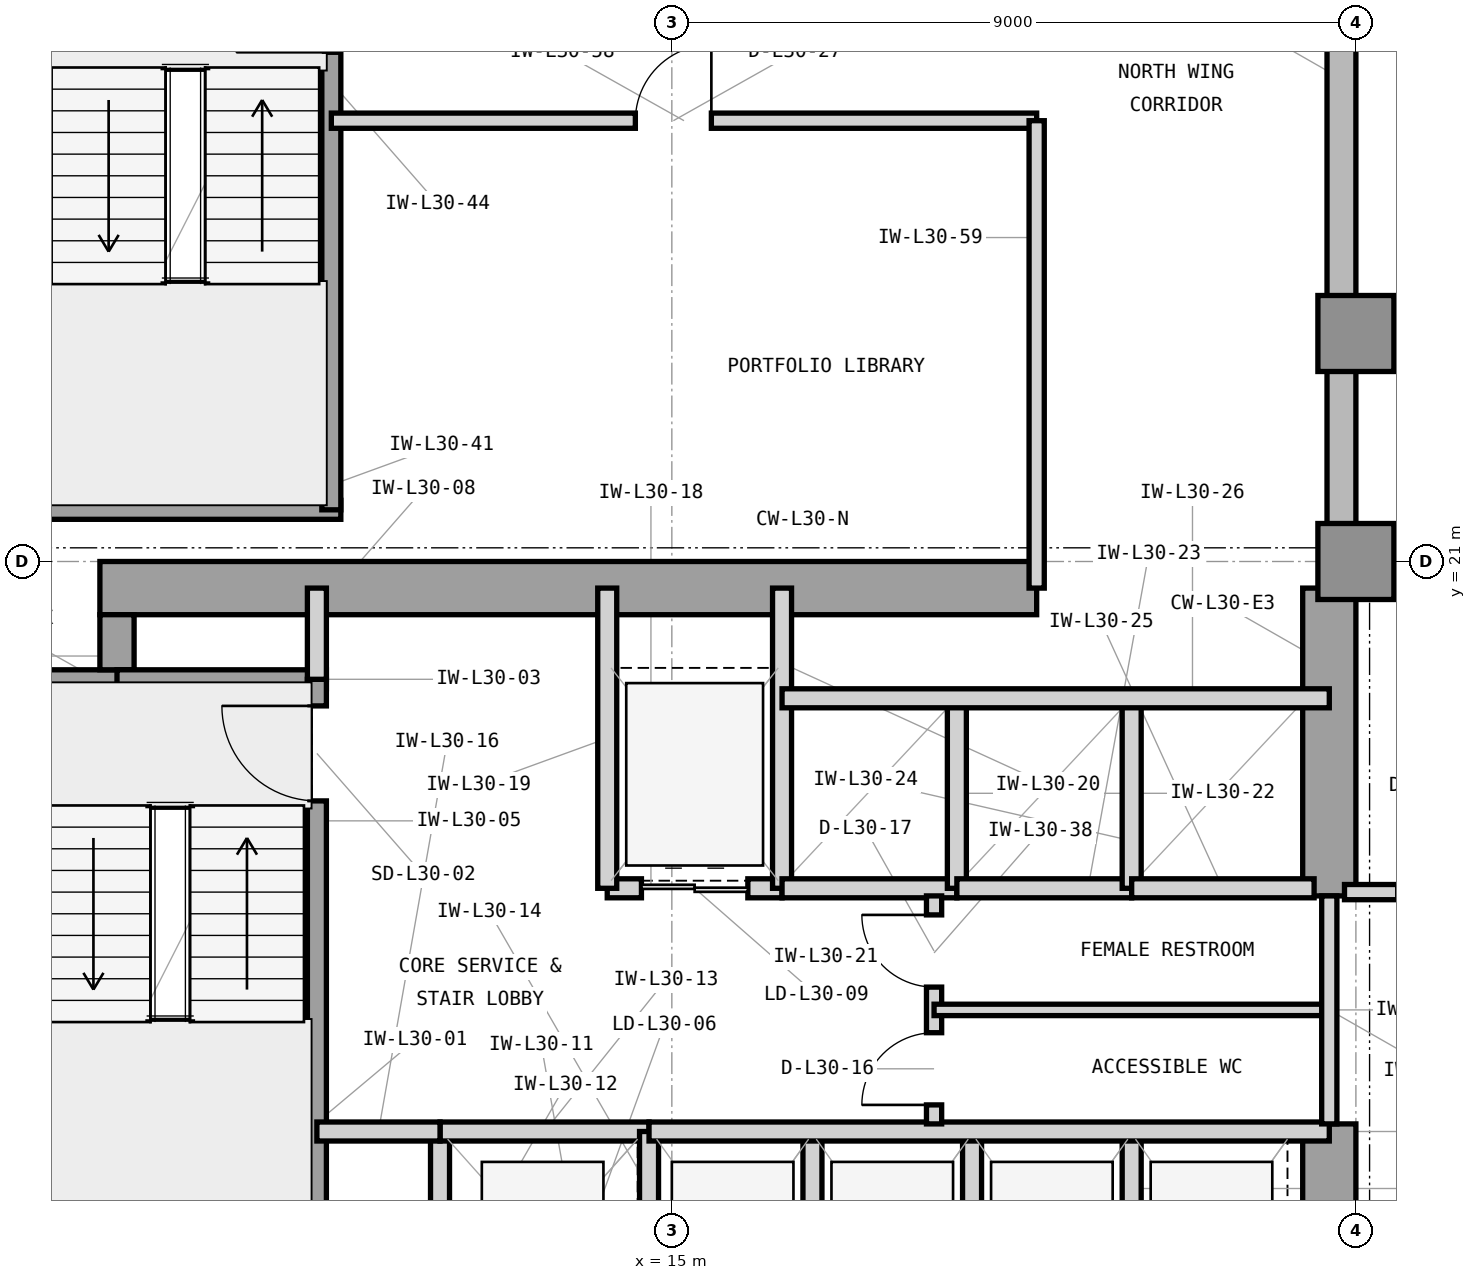
"""IFC4 building model, lengths in metres.
Left out: names, types, materials, properties, quantities, classifications, styles, units other than length and angle.
Written with IfcOpenShell. Run it as: python <this file> out.ifc"""

import sys

from ifc_helpers import new_model, si_unit, direction, frame, frame_2d, origin, origin_2d, place, context, subcontext, project, spatial, rectangle, extrude, element, fill, save


model = new_model("IFC4")
c1 = context("Model", 3, precision=1e-05, world=origin(), true_north=direction((0.0, 1.0)))
c2 = subcontext(c1, "Body", "Model", "MODEL_VIEW")
j1 = project(units=[si_unit("LENGTHUNIT", "METRE"), si_unit("PLANEANGLEUNIT", "RADIAN")], contexts=[c1])
p1 = place(None, origin())
s1 = spatial("IfcSite", under=j1, at=p1, CompositionType="ELEMENT")
p2 = place(p1, origin())
s2 = spatial("IfcBuilding", under=s1, at=p2, CompositionType="ELEMENT")
p3 = place(p2, frame((0.0, 0.0, 128.4)))
s3 = spatial("IfcBuildingStorey", under=s2, at=p3, CompositionType="ELEMENT", Elevation=128.4)
p4 = place(p3, frame((7.475, 20.65, 0.0), z_axis=(0.0, 0.0, 1.0), x_axis=(1.0, 0.0, 0.0)))
e1 = element("IfcWall", 1, at=p4, inside=s3, PredefinedType="SHEAR", context=c2, shape_type="SweptSolid", body=[
    extrude(rectangle(XDim=12.325, YDim=0.7, at=frame_2d((6.163, 0.0))), origin(), (0.0, 0.0, 1.0), 3.9),
])
p5 = place(p3, frame((23.65, 10.4, 0.0), z_axis=(0.0, 0.0, 1.0), x_axis=(0.0, 1.0, 0.0)))
e2 = element("IfcWall", 2, at=p5, inside=s3, PredefinedType="SHEAR", context=c2, shape_type="SweptSolid", body=[
    extrude(rectangle(XDim=3.2, YDim=0.7, at=frame_2d((1.6, 0.0))), origin(), (0.0, 0.0, 1.0), 3.9),
])
p6 = place(p3, frame((23.65, 16.6, 0.0), z_axis=(0.0, 0.0, 1.0), x_axis=(0.0, 1.0, 0.0)))
e3 = element("IfcWall", 3, at=p6, inside=s3, PredefinedType="SHEAR", context=c2, shape_type="SweptSolid", body=[
    extrude(rectangle(XDim=4.05, YDim=0.7, at=frame_2d((2.025, 0.0))), origin(), (0.0, 0.0, 1.0), 3.9),
])
p7 = place(p3, frame((6.7, 19.35, 0.0), z_axis=(0.0, 0.0, 1.0), x_axis=(1.0, 0.0, 0.0)))
e4 = element("IfcWall", 4, at=p7, inside=s3, PredefinedType="SHEAR", context=c2, shape_type="SweptSolid", body=[
    extrude(rectangle(XDim=1.225, YDim=0.45, at=frame_2d((0.613, 0.0))), origin(), (0.0, 0.0, 1.0), 3.9),
])
p8 = place(p3, frame((7.7, 19.575, 0.0), z_axis=(0.0, 0.0, 1.0), x_axis=(0.0, 1.0, 0.0)))
e5 = element("IfcWall", 5, at=p8, inside=s3, PredefinedType="SHEAR", context=c2, shape_type="SweptSolid", body=[
    extrude(rectangle(XDim=0.725, YDim=0.45, at=frame_2d((0.363, 0.0))), origin(), (0.0, 0.0, 1.0), 3.9),
])
for number, where, z_axis, x_axis in (
    (6, (24.0, 21.0, 0.0), (0.0, 0.0, 1.0), (1.0, 0.0, 0.0)),
    (7, (24.0, 24.0, 0.0), (0.0, 0.0, 1.0), (1.0, 0.0, 0.0)),
):
    element("IfcColumn", number, at=place(p3, frame(where, z_axis=z_axis, x_axis=x_axis)), inside=s3, PredefinedType="COLUMN", context=c2, shape_type="SweptSolid", body=[
        extrude(rectangle(XDim=1.0, YDim=1.0, at=origin_2d()), origin(), (0.0, 0.0, 1.0), 3.9),
    ])
p9 = place(p3, frame((41.55, 20.81, 0.0), z_axis=(0.0, 0.0, 1.0), x_axis=(-1.0, 0.0, 0.0)))
e8 = element("IfcWall", 8, at=p9, inside=s3, PredefinedType="STANDARD", context=c2, shape_type="SweptSolid", body=[
    extrude(rectangle(XDim=17.55, YDim=0.38, at=frame_2d((8.775, 0.0))), origin(), (0.0, 0.0, 1.0), 3.7),
])
p10 = place(p9, frame((2.025, 0.0, 0.85)))
e9 = element("IfcOpeningElement", 9, at=p10, cuts=e8, PredefinedType="OPENING", context=c2, shape_type="SweptSolid", body=[
    extrude(rectangle(XDim=1.8, YDim=2.25, at=frame_2d((0.9, 1.125))), frame((0.0, 0.2, 0.0), z_axis=(0.0, -1.0, 0.0), x_axis=(1.0, 0.0, 0.0)), (0.0, 0.0, 1.0), 0.4),
])
p11 = place(p9, frame((15.384, 0.0, 0.85)))
e10 = element("IfcOpeningElement", 10, at=p11, cuts=e8, PredefinedType="OPENING", context=c2, shape_type="SweptSolid", body=[
    extrude(rectangle(XDim=1.2, YDim=2.25, at=frame_2d((0.6, 1.125))), frame((0.0, 0.2, 0.0), z_axis=(0.0, -1.0, 0.0), x_axis=(1.0, 0.0, 0.0)), (0.0, 0.0, 1.0), 0.4),
])
p12 = place(p9, frame((9.854, 0.0, 0.85)))
e11 = element("IfcOpeningElement", 11, at=p12, cuts=e8, PredefinedType="OPENING", context=c2, shape_type="SweptSolid", body=[
    extrude(rectangle(XDim=2.5, YDim=2.25, at=frame_2d((1.25, 1.125))), frame((0.0, 0.2, 0.0), z_axis=(0.0, -1.0, 0.0), x_axis=(1.0, 0.0, 0.0)), (0.0, 0.0, 1.0), 0.4),
])
p13 = place(p3, frame((23.81, 21.0, 0.0), z_axis=(0.0, 0.0, 1.0), x_axis=(0.0, 1.0, 0.0)))
e12 = element("IfcWall", 12, at=p13, inside=s3, PredefinedType="STANDARD", context=c2, shape_type="SweptSolid", body=[
    extrude(rectangle(XDim=25.4, YDim=0.38, at=frame_2d((12.7, 0.0))), origin(), (0.0, 0.0, 1.0), 3.7),
])
p14 = place(p13, frame((11.45, 0.0, 0.85)))
e13 = element("IfcOpeningElement", 13, at=p14, cuts=e12, PredefinedType="OPENING", context=c2, shape_type="SweptSolid", body=[
    extrude(rectangle(XDim=2.5, YDim=2.25, at=frame_2d((1.25, 1.125))), frame((0.0, 0.2, 0.0), z_axis=(0.0, -1.0, 0.0), x_axis=(1.0, 0.0, 0.0)), (0.0, 0.0, 1.0), 0.4),
])
p15 = place(p13, frame((15.974, 0.0, 0.85)))
e14 = element("IfcOpeningElement", 14, at=p15, cuts=e12, PredefinedType="OPENING", context=c2, shape_type="SweptSolid", body=[
    extrude(rectangle(XDim=1.2, YDim=2.25, at=frame_2d((0.6, 1.125))), frame((0.0, 0.2, 0.0), z_axis=(0.0, -1.0, 0.0), x_axis=(1.0, 0.0, 0.0)), (0.0, 0.0, 1.0), 0.4),
])
p16 = place(p3, frame((7.7, 19.45, 0.0), z_axis=(0.0, 0.0, 1.0), x_axis=(1.0, 0.0, 0.0)))
e15 = element("IfcWall", 15, at=p16, inside=s3, PredefinedType="SHEAR", context=c2, shape_type="SweptSolid", body=[
    extrude(rectangle(XDim=2.755, YDim=0.25, at=frame_2d((1.377, 0.0))), origin(), (0.0, 0.0, 1.0), 3.9),
])
p17 = place(p3, frame((10.33, 12.0, 0.0), z_axis=(0.0, 0.0, 1.0), x_axis=(0.0, 1.0, 0.0)))
e16 = element("IfcWall", 16, at=p17, inside=s3, PredefinedType="SHEAR", context=c2, shape_type="SweptSolid", body=[
    extrude(rectangle(XDim=7.45, YDim=0.25, at=frame_2d((3.725, 0.0))), origin(), (0.0, 0.0, 1.0), 3.9),
])
p18 = place(p17, frame((5.85, 0.0, 0.0)))
e17 = element("IfcOpeningElement", 17, at=p18, cuts=e16, PredefinedType="OPENING", context=c2, shape_type="SweptSolid", body=[
    extrude(rectangle(XDim=1.25, YDim=2.2, at=frame_2d((0.625, 1.1))), frame((0.0, 0.135, 0.0), z_axis=(0.0, -1.0, 0.0), x_axis=(1.0, 0.0, 0.0)), (0.0, 0.0, 1.0), 0.27),
])
p19 = place(p3, frame((10.33, 19.45, 0.0), z_axis=(0.0, 0.0, 1.0), x_axis=(0.0, 1.0, 0.0)))
e18 = element("IfcWall", 18, at=p19, inside=s3, PredefinedType="PARTITIONING", context=c2, shape_type="SweptSolid", body=[
    extrude(rectangle(XDim=1.2, YDim=0.25, at=frame_2d((0.6, 0.0))), origin(), (0.0, 0.0, 1.0), 2.994),
])
p20 = place(p3, frame((11.95, 10.5, 0.0), z_axis=(0.0, 0.0, 1.0), x_axis=(0.0, 1.0, 0.0)))
e19 = element("IfcWall", 19, at=p20, inside=s3, PredefinedType="PARTITIONING", context=c2, shape_type="SweptSolid", body=[
    extrude(rectangle(XDim=3.0, YDim=0.25, at=frame_2d((1.5, 0.0))), origin(), (0.0, 0.0, 1.0), 3.69),
])
p21 = place(p3, frame((11.95, 13.5, 0.0), z_axis=(0.0, 0.0, 1.0), x_axis=(1.0, 0.0, 0.0)))
e20 = element("IfcWall", 20, at=p21, inside=s3, PredefinedType="PARTITIONING", context=c2, shape_type="SweptSolid", body=[
    extrude(rectangle(XDim=2.75, YDim=0.25, at=frame_2d((1.375, 0.0))), origin(), (0.0, 0.0, 1.0), 3.233),
])
p22 = place(p3, frame((14.7, 10.5, 0.0), z_axis=(0.0, 0.0, 1.0), x_axis=(0.0, 1.0, 0.0)))
e21 = element("IfcWall", 21, at=p22, inside=s3, PredefinedType="PARTITIONING", context=c2, shape_type="SweptSolid", body=[
    extrude(rectangle(XDim=3.0, YDim=0.25, at=frame_2d((1.5, 0.0))), origin(), (0.0, 0.0, 1.0), 3.69),
])
p23 = place(p3, frame((10.33, 13.5, 0.0), z_axis=(0.0, 0.0, 1.0), x_axis=(1.0, 0.0, 0.0)))
e22 = element("IfcWall", 22, at=p23, inside=s3, PredefinedType="PARTITIONING", context=c2, shape_type="SweptSolid", body=[
    extrude(rectangle(XDim=1.62, YDim=0.25, at=frame_2d((0.81, 0.0))), origin(), (0.0, 0.0, 1.0), 3.233),
])
p24 = place(p3, frame((14.15, 16.7, 0.0), z_axis=(0.0, 0.0, 1.0), x_axis=(1.0, 0.0, 0.0)))
e23 = element("IfcWall", 23, at=p24, inside=s3, PredefinedType="PARTITIONING", context=c2, shape_type="SweptSolid", body=[
    extrude(rectangle(XDim=2.3, YDim=0.25, at=frame_2d((1.15, 0.0))), origin(), (0.0, 0.0, 1.0), 3.233),
])
p25 = place(p24, frame((0.45, 0.0, 0.0)))
e24 = element("IfcOpeningElement", 24, at=p25, cuts=e23, PredefinedType="OPENING", context=c2, shape_type="SweptSolid", body=[
    extrude(rectangle(XDim=1.4, YDim=2.35, at=frame_2d((0.7, 1.175))), frame((0.0, 0.135, 0.0), z_axis=(0.0, -1.0, 0.0), x_axis=(1.0, 0.0, 0.0)), (0.0, 0.0, 1.0), 0.27),
])
for number, where, z_axis, x_axis in (
    (25, (14.15, 16.7, 0.0), (0.0, 0.0, 1.0), (0.0, 1.0, 0.0)),
    (26, (16.45, 16.7, 0.0), (0.0, 0.0, 1.0), (0.0, 1.0, 0.0)),
):
    element("IfcWall", number, at=place(p3, frame(where, z_axis=z_axis, x_axis=x_axis)), inside=s3, PredefinedType="PARTITIONING", context=c2, shape_type="SweptSolid", body=[
        extrude(rectangle(XDim=3.95, YDim=0.25, at=frame_2d((1.975, 0.0))), origin(), (0.0, 0.0, 1.0), 3.69),
    ])
p26 = place(p3, frame((16.45, 16.7, 0.0), z_axis=(0.0, 0.0, 1.0), x_axis=(1.0, 0.0, 0.0)))
e27 = element("IfcWall", 27, at=p26, inside=s3, PredefinedType="PARTITIONING", context=c2, shape_type="SweptSolid", body=[
    extrude(rectangle(XDim=2.3, YDim=0.25, at=frame_2d((1.15, 0.0))), origin(), (0.0, 0.0, 1.0), 3.233),
])
p27 = place(p3, frame((18.75, 16.7, 0.0), z_axis=(0.0, 0.0, 1.0), x_axis=(0.0, 1.0, 0.0)))
e28 = element("IfcWall", 28, at=p27, inside=s3, PredefinedType="PARTITIONING", context=c2, shape_type="SweptSolid", body=[
    extrude(rectangle(XDim=2.5, YDim=0.25, at=frame_2d((1.25, 0.0))), origin(), (0.0, 0.0, 1.0), 3.69),
])
p28 = place(p3, frame((18.75, 16.7, 0.0), z_axis=(0.0, 0.0, 1.0), x_axis=(1.0, 0.0, 0.0)))
e29 = element("IfcWall", 29, at=p28, inside=s3, PredefinedType="PARTITIONING", context=c2, shape_type="SweptSolid", body=[
    extrude(rectangle(XDim=2.3, YDim=0.25, at=frame_2d((1.15, 0.0))), origin(), (0.0, 0.0, 1.0), 3.233),
])
p29 = place(p3, frame((21.05, 16.7, 0.0), z_axis=(0.0, 0.0, 1.0), x_axis=(0.0, 1.0, 0.0)))
e30 = element("IfcWall", 30, at=p29, inside=s3, PredefinedType="PARTITIONING", context=c2, shape_type="SweptSolid", body=[
    extrude(rectangle(XDim=2.5, YDim=0.25, at=frame_2d((1.25, 0.0))), origin(), (0.0, 0.0, 1.0), 3.69),
])
p30 = place(p3, frame((21.05, 16.7, 0.0), z_axis=(0.0, 0.0, 1.0), x_axis=(1.0, 0.0, 0.0)))
e31 = element("IfcWall", 31, at=p30, inside=s3, PredefinedType="PARTITIONING", context=c2, shape_type="SweptSolid", body=[
    extrude(rectangle(XDim=2.4, YDim=0.25, at=frame_2d((1.2, 0.0))), origin(), (0.0, 0.0, 1.0), 3.233),
])
p31 = place(p3, frame((16.45, 19.2, 0.0), z_axis=(0.0, 0.0, 1.0), x_axis=(1.0, 0.0, 0.0)))
e32 = element("IfcWall", 32, at=p31, inside=s3, PredefinedType="PARTITIONING", context=c2, shape_type="SweptSolid", body=[
    extrude(rectangle(XDim=7.2, YDim=0.25, at=frame_2d((3.6, 0.0))), origin(), (0.0, 0.0, 1.0), 3.69),
])
for number, where, z_axis, x_axis in (
    (33, (16.85, 10.5, 0.0), (0.0, 0.0, 1.0), (0.0, 1.0, 0.0)),
    (34, (18.95, 10.5, 0.0), (0.0, 0.0, 1.0), (0.0, 1.0, 0.0)),
    (35, (21.05, 10.5, 0.0), (0.0, 0.0, 1.0), (0.0, 1.0, 0.0)),
):
    element("IfcWall", number, at=place(p3, frame(where, z_axis=z_axis, x_axis=x_axis)), inside=s3, PredefinedType="PARTITIONING", context=c2, shape_type="SweptSolid", body=[
        extrude(rectangle(XDim=3.0, YDim=0.25, at=frame_2d((1.5, 0.0))), origin(), (0.0, 0.0, 1.0), 3.69),
    ])
p32 = place(p3, frame((14.7, 13.5, 0.0), z_axis=(0.0, 0.0, 1.0), x_axis=(1.0, 0.0, 0.0)))
e36 = element("IfcWall", 36, at=p32, inside=s3, PredefinedType="PARTITIONING", context=c2, shape_type="SweptSolid", body=[
    extrude(rectangle(XDim=8.95, YDim=0.25, at=frame_2d((4.475, 0.0))), origin(), (0.0, 0.0, 1.0), 3.233),
])
p33 = place(p3, frame((18.45, 13.6, 0.0), z_axis=(0.0, 0.0, 1.0), x_axis=(0.0, 1.0, 0.0)))
e37 = element("IfcWall", 37, at=p33, inside=s3, PredefinedType="PARTITIONING", context=c2, shape_type="SweptSolid", body=[
    extrude(rectangle(XDim=3.0, YDim=0.2, at=frame_2d((1.5, 0.0))), origin(), (0.0, 0.0, 1.0), 3.69),
])
p34 = place(p33, frame((0.25, 0.0, 0.0)))
e38 = element("IfcOpeningElement", 38, at=p34, cuts=e37, PredefinedType="OPENING", context=c2, shape_type="SweptSolid", body=[
    extrude(rectangle(XDim=0.95, YDim=2.1, at=frame_2d((0.475, 1.05))), frame((0.0, 0.11, 0.0), z_axis=(0.0, -1.0, 0.0), x_axis=(1.0, 0.0, 0.0)), (0.0, 0.0, 1.0), 0.22),
])
p35 = place(p33, frame((1.8, 0.0, 0.0)))
e39 = element("IfcOpeningElement", 39, at=p35, cuts=e37, PredefinedType="OPENING", context=c2, shape_type="SweptSolid", body=[
    extrude(rectangle(XDim=0.95, YDim=2.1, at=frame_2d((0.475, 1.05))), frame((0.0, 0.11, 0.0), z_axis=(0.0, -1.0, 0.0), x_axis=(1.0, 0.0, 0.0)), (0.0, 0.0, 1.0), 0.22),
])
p36 = place(p3, frame((18.45, 15.1, 0.0), z_axis=(0.0, 0.0, 1.0), x_axis=(1.0, 0.0, 0.0)))
e40 = element("IfcWall", 40, at=p36, inside=s3, PredefinedType="PARTITIONING", context=c2, shape_type="SweptSolid", body=[
    extrude(rectangle(XDim=5.2, YDim=0.15, at=frame_2d((2.6, 0.0))), origin(), (0.0, 0.0, 1.0), 3.69),
])
p37 = place(p3, frame((23.65, 13.6, 0.0), z_axis=(0.0, 0.0, 1.0), x_axis=(0.0, 1.0, 0.0)))
e41 = element("IfcWall", 41, at=p37, inside=s3, PredefinedType="PARTITIONING", context=c2, shape_type="SweptSolid", body=[
    extrude(rectangle(XDim=3.0, YDim=0.2, at=frame_2d((1.5, 0.0))), origin(), (0.0, 0.0, 1.0), 3.69),
])
p38 = place(p3, frame((6.555, 21.68, 0.0), z_axis=(0.0, 0.0, 1.0), x_axis=(1.0, 0.0, 0.0)))
e42 = element("IfcWall", 42, at=p38, inside=s3, PredefinedType="SHEAR", context=c2, shape_type="SweptSolid", body=[
    extrude(rectangle(XDim=4.09, YDim=0.25, at=frame_2d((2.045, 0.0))), origin(), (0.0, 0.0, 1.0), 3.9),
])
p39 = place(p3, frame((10.52, 21.68, 0.0), z_axis=(0.0, 0.0, 1.0), x_axis=(0.0, 1.0, 0.0)))
e43 = element("IfcWall", 43, at=p39, inside=s3, PredefinedType="SHEAR", context=c2, shape_type="SweptSolid", body=[
    extrude(rectangle(XDim=7.5, YDim=0.25, at=frame_2d((3.75, 0.0))), origin(), (0.0, 0.0, 1.0), 3.9),
])
p40 = place(p39, frame((6.02, 0.0, 0.0)))
e44 = element("IfcOpeningElement", 44, at=p40, cuts=e43, PredefinedType="OPENING", context=c2, shape_type="SweptSolid", body=[
    extrude(rectangle(XDim=1.25, YDim=2.2, at=frame_2d((0.625, 1.1))), frame((0.0, 0.135, 0.0), z_axis=(0.0, -1.0, 0.0), x_axis=(1.0, 0.0, 0.0)), (0.0, 0.0, 1.0), 0.27),
])
p41 = place(p3, frame((23.85, 16.65, 0.0), z_axis=(0.0, 0.0, 1.0), x_axis=(1.0, 0.0, 0.0)))
e45 = element("IfcWall", 45, at=p41, inside=s3, PredefinedType="PARTITIONING", context=c2, shape_type="SweptSolid", body=[
    extrude(rectangle(XDim=2.85, YDim=0.2, at=frame_2d((1.425, 0.0))), origin(), (0.0, 0.0, 1.0), 3.69),
])
p42 = place(p41, frame((0.7, 0.0, 0.0)))
e46 = element("IfcOpeningElement", 46, at=p42, cuts=e45, PredefinedType="OPENING", context=c2, shape_type="SweptSolid", body=[
    extrude(rectangle(XDim=1.0, YDim=2.15, at=frame_2d((0.5, 1.075))), frame((0.0, 0.11, 0.0), z_axis=(0.0, -1.0, 0.0), x_axis=(1.0, 0.0, 0.0)), (0.0, 0.0, 1.0), 0.22),
])
p43 = place(p3, frame((10.52, 26.8, 0.0), z_axis=(0.0, 0.0, 1.0), x_axis=(1.0, 0.0, 0.0)))
e47 = element("IfcWall", 47, at=p43, inside=s3, PredefinedType="PARTITIONING", context=c2, shape_type="SweptSolid", body=[
    extrude(rectangle(XDim=9.28, YDim=0.2, at=frame_2d((4.64, 0.0))), origin(), (0.0, 0.0, 1.0), 3.69),
])
p44 = place(p43, frame((4.0, 0.0, 0.0)))
e48 = element("IfcOpeningElement", 48, at=p44, cuts=e47, PredefinedType="OPENING", context=c2, shape_type="SweptSolid", body=[
    extrude(rectangle(XDim=1.0, YDim=2.15, at=frame_2d((0.5, 1.075))), frame((0.0, 0.11, 0.0), z_axis=(0.0, -1.0, 0.0), x_axis=(1.0, 0.0, 0.0)), (0.0, 0.0, 1.0), 0.22),
])
p45 = place(p3, frame((19.8, 20.65, 0.0), z_axis=(0.0, 0.0, 1.0), x_axis=(0.0, 1.0, 0.0)))
e49 = element("IfcWall", 49, at=p45, inside=s3, PredefinedType="PARTITIONING", context=c2, shape_type="SweptSolid", body=[
    extrude(rectangle(XDim=6.15, YDim=0.2, at=frame_2d((3.075, 0.0))), origin(), (0.0, 0.0, 1.0), 3.69),
])
p46 = place(p18, origin())
e50 = element("IfcDoor", 50, at=p46, inside=s3, OperationType="SINGLE_SWING_RIGHT", PredefinedType="DOOR", context=c2, shape_type="SweptSolid", body=[
    extrude(rectangle(XDim=1.25, YDim=2.2, at=frame_2d((0.625, 1.1))), frame((0.0, 0.025, 0.0), z_axis=(0.0, -1.0, 0.0), x_axis=(1.0, 0.0, 0.0)), (0.0, 0.0, 1.0), 0.05),
])
fill(e17, e50)
p47 = place(p25, origin())
e51 = element("IfcDoor", 51, at=p47, inside=s3, OperationType="DOUBLE_DOOR_SLIDING", PredefinedType="DOOR", context=c2, shape_type="SweptSolid", body=[
    extrude(rectangle(XDim=1.4, YDim=2.35, at=frame_2d((0.7, 1.175))), frame((0.0, 0.025, 0.0), z_axis=(0.0, -1.0, 0.0), x_axis=(1.0, 0.0, 0.0)), (0.0, 0.0, 1.0), 0.05),
])
fill(e24, e51)
p48 = place(p34, origin())
e52 = element("IfcDoor", 52, at=p48, inside=s3, OperationType="SINGLE_SWING_LEFT", PredefinedType="DOOR", context=c2, shape_type="SweptSolid", body=[
    extrude(rectangle(XDim=0.95, YDim=2.1, at=frame_2d((0.475, 1.05))), frame((0.0, 0.025, 0.0), z_axis=(0.0, -1.0, 0.0), x_axis=(1.0, 0.0, 0.0)), (0.0, 0.0, 1.0), 0.05),
])
fill(e38, e52)
p49 = place(p35, origin())
e53 = element("IfcDoor", 53, at=p49, inside=s3, OperationType="SINGLE_SWING_RIGHT", PredefinedType="DOOR", context=c2, shape_type="SweptSolid", body=[
    extrude(rectangle(XDim=0.95, YDim=2.1, at=frame_2d((0.475, 1.05))), frame((0.0, 0.025, 0.0), z_axis=(0.0, -1.0, 0.0), x_axis=(1.0, 0.0, 0.0)), (0.0, 0.0, 1.0), 0.05),
])
fill(e39, e53)
p50 = place(p44, origin())
e54 = element("IfcDoor", 54, at=p50, inside=s3, OperationType="SINGLE_SWING_RIGHT", PredefinedType="DOOR", context=c2, shape_type="SweptSolid", body=[
    extrude(rectangle(XDim=1.0, YDim=2.15, at=frame_2d((0.5, 1.075))), frame((0.0, 0.025, 0.0), z_axis=(0.0, -1.0, 0.0), x_axis=(1.0, 0.0, 0.0)), (0.0, 0.0, 1.0), 0.05),
])
fill(e48, e54)
save(model, sys.argv[1])
